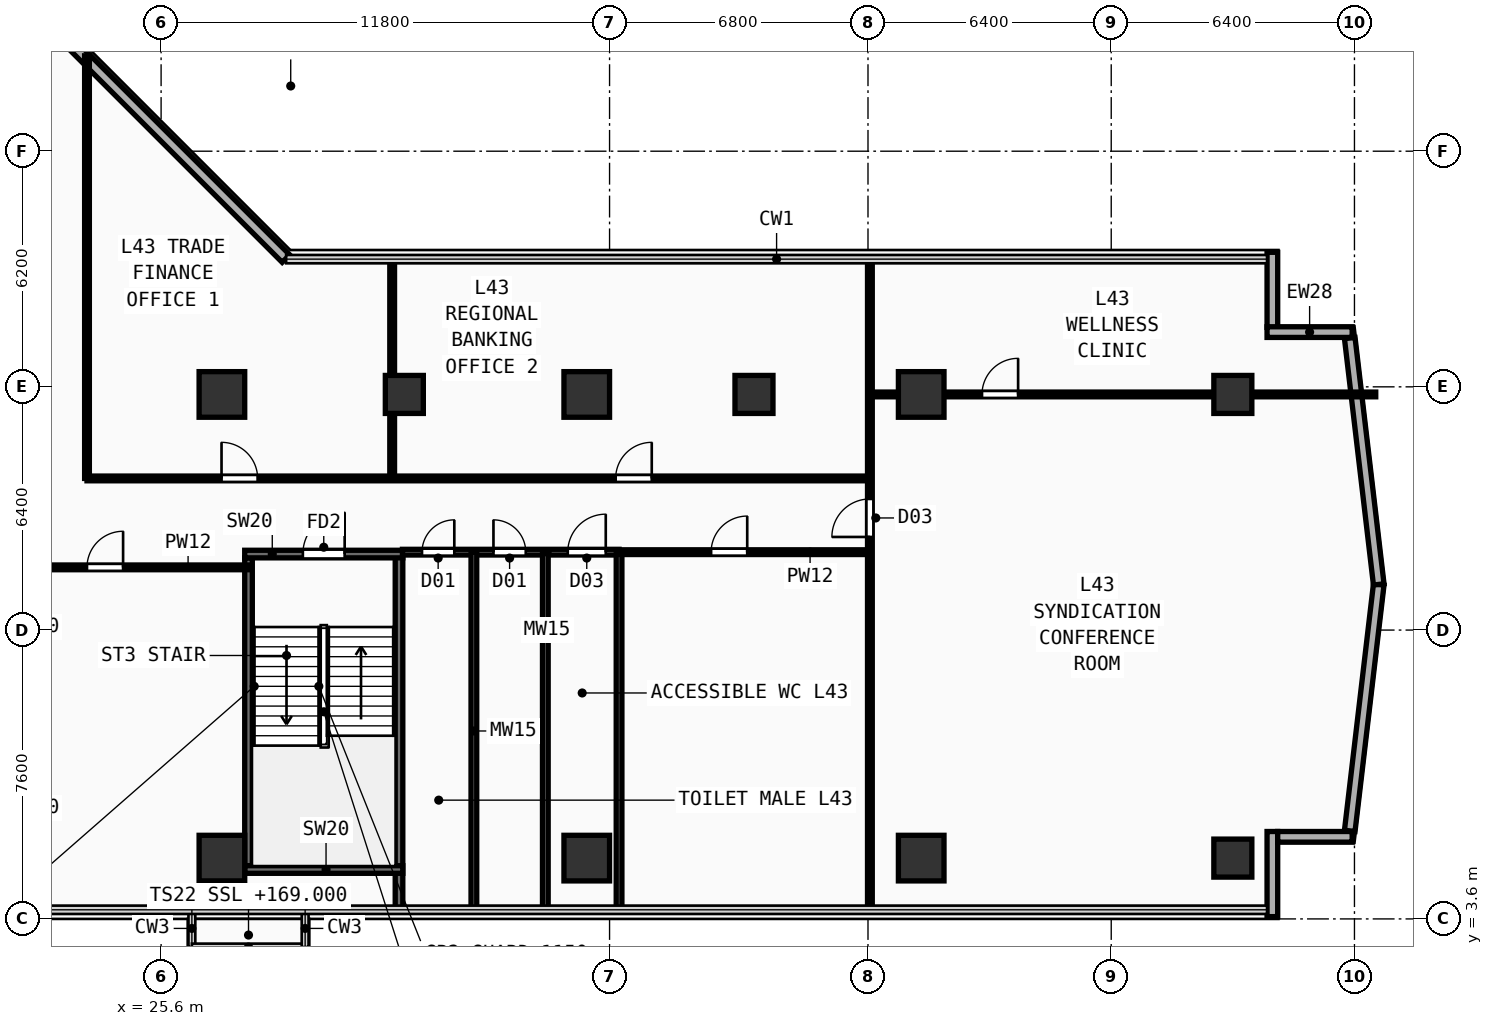
"""IFC4 building model, lengths in metres.
Left out: names, types, materials, properties, quantities, classifications, styles, units other than length and angle.
Written with IfcOpenShell. Run it as: python <this file> out.ifc"""

import sys

from ifc_helpers import new_model, si_unit, direction, frame, frame_2d, origin, origin_2d, place, context, subcontext, project, spatial, rectangle, extrude, element, fill, save


model = new_model("IFC4")
c1 = context("Model", 3, precision=1e-05, world=origin(), true_north=direction((0.0, 1.0)))
c2 = subcontext(c1, "Body", "Model", "MODEL_VIEW")
j1 = project(units=[si_unit("LENGTHUNIT", "METRE"), si_unit("PLANEANGLEUNIT", "RADIAN")], contexts=[c1])
p1 = place(None, origin())
s1 = spatial("IfcSite", under=j1, at=p1, CompositionType="ELEMENT")
p2 = place(p1, origin())
s2 = spatial("IfcBuilding", under=s1, at=p2, CompositionType="ELEMENT")
p3 = place(p2, frame((0.0, 0.0, 169.0)))
s3 = spatial("IfcBuildingStorey", under=s2, at=p3, CompositionType="ELEMENT", Elevation=169.0)
for number, where, z_axis, x_axis in (
    (1, (27.2, 5.2, 0.0), (0.0, 0.0, 1.0), (1.0, 0.0, 0.0)),
    (2, (36.8, 5.2, 0.0), (0.0, 0.0, 1.0), (1.0, 0.0, 0.0)),
    (3, (45.6, 5.2, 0.0), (0.0, 0.0, 1.0), (1.0, 0.0, 0.0)),
    (4, (27.2, 17.4, 0.0), (0.0, 0.0, 1.0), (1.0, 0.0, 0.0)),
    (5, (36.8, 17.4, 0.0), (0.0, 0.0, 1.0), (1.0, 0.0, 0.0)),
    (6, (45.6, 17.4, 0.0), (0.0, 0.0, 1.0), (1.0, 0.0, 0.0)),
):
    element("IfcColumn", number, at=place(p3, frame(where, z_axis=z_axis, x_axis=x_axis)), inside=s3, PredefinedType="COLUMN", context=c2, shape_type="SweptSolid", body=[
        extrude(rectangle(XDim=1.2, YDim=1.2, at=origin_2d()), origin(), (0.0, 0.0, 1.0), 3.56),
    ])
for number, where, z_axis, x_axis in (
    (7, (53.8, 5.2, 0.0), (0.0, 0.0, 1.0), (1.0, 0.0, 0.0)),
    (8, (53.8, 17.4, 0.0), (0.0, 0.0, 1.0), (1.0, 0.0, 0.0)),
    (9, (32.0, 17.4, 0.0), (0.0, 0.0, 1.0), (1.0, 0.0, 0.0)),
    (10, (41.2, 17.4, 0.0), (0.0, 0.0, 1.0), (1.0, 0.0, 0.0)),
):
    element("IfcColumn", number, at=place(p3, frame(where, z_axis=z_axis, x_axis=x_axis)), inside=s3, PredefinedType="COLUMN", context=c2, shape_type="SweptSolid", body=[
        extrude(rectangle(XDim=1.0, YDim=1.0, at=origin_2d()), origin(), (0.0, 0.0, 1.0), 3.56),
    ])
p4 = place(p3, frame((54.84, 3.66, 0.0), z_axis=(0.0, 0.0, 1.0), x_axis=(0.0, 1.0, 0.0)))
e11 = element("IfcWall", 11, at=p4, inside=s3, PredefinedType="SOLIDWALL", context=c2, shape_type="SweptSolid", body=[
    extrude(rectangle(XDim=2.24, YDim=0.28, at=frame_2d((1.12, 0.0))), origin(), (0.0, 0.0, 1.0), 3.56),
])
p5 = place(p3, frame((54.98, 5.76, 0.0), z_axis=(0.0, 0.0, 1.0), x_axis=(1.0, 0.0, 0.0)))
e12 = element("IfcWall", 12, at=p5, inside=s3, PredefinedType="SOLIDWALL", context=c2, shape_type="SweptSolid", body=[
    extrude(rectangle(XDim=1.96, YDim=0.28, at=frame_2d((0.98, 0.0))), origin(), (0.0, 0.0, 1.0), 3.56),
])
p6 = place(p3, frame((54.84, 19.165, 0.0), z_axis=(0.0, 0.0, 1.0), x_axis=(0.0, 1.0, 0.0)))
e13 = element("IfcWall", 13, at=p6, inside=s3, PredefinedType="SOLIDWALL", context=c2, shape_type="SweptSolid", body=[
    extrude(rectangle(XDim=1.975, YDim=0.28, at=frame_2d((0.987, 0.0))), origin(), (0.0, 0.0, 1.0), 3.56),
])
p7 = place(p3, frame((54.7, 19.04, 0.0), z_axis=(0.0, 0.0, 1.0), x_axis=(1.0, 0.0, 0.0)))
e14 = element("IfcWall", 14, at=p7, inside=s3, PredefinedType="SOLIDWALL", context=c2, shape_type="SweptSolid", body=[
    extrude(rectangle(XDim=2.24, YDim=0.28, at=frame_2d((1.12, 0.0))), origin(), (0.0, 0.0, 1.0), 3.56),
])
p8 = place(p3, frame((28.885, 20.975, 0.0), z_axis=(0.0, 0.0, 1.0), x_axis=(-0.707106781187, 0.707106781187, 0.0)))
e15 = element("IfcWall", 15, at=p8, inside=s3, PredefinedType="SOLIDWALL", context=c2, shape_type="SweptSolid", body=[
    extrude(rectangle(XDim=9.207, YDim=0.28, at=frame_2d((4.603, 0.0))), origin(), (0.0, 0.0, 1.0), 3.56),
])
for number, where, z_axis, x_axis in (
    (16, (56.876, 5.917, 0.0), (0.0, 0.0, 1.0), (0.117, 0.993, 0.0)),
    (17, (57.639, 12.401, 0.0), (0.0, 0.0, 1.0), (-0.117, 0.993, 0.0)),
):
    element("IfcWall", number, at=place(p3, frame(where, z_axis=z_axis, x_axis=x_axis)), inside=s3, PredefinedType="SOLIDWALL", context=c2, shape_type="SweptSolid", body=[
        extrude(rectangle(XDim=6.527, YDim=0.28, at=frame_2d((3.263, 0.0))), origin(), (0.0, 0.0, 1.0), 3.56),
    ])
p9 = place(p3, frame((27.9, 5.0, 0.0), z_axis=(0.0, 0.0, 1.0), x_axis=(0.0, 1.0, 0.0)))
e18 = element("IfcWall", 18, at=p9, inside=s3, PredefinedType="SHEAR", context=c2, shape_type="SweptSolid", body=[
    extrude(rectangle(XDim=8.1, YDim=0.2, at=frame_2d((4.05, 0.0))), origin(), (0.0, 0.0, 1.0), 3.56),
])
p10 = place(p3, frame((31.86, 3.84, 0.0), z_axis=(0.0, 0.0, 1.0), x_axis=(0.0, 1.0, 0.0)))
e19 = element("IfcWall", 19, at=p10, inside=s3, PredefinedType="SHEAR", context=c2, shape_type="SweptSolid", body=[
    extrude(rectangle(XDim=9.41, YDim=0.2, at=frame_2d((4.705, 0.0))), origin(), (0.0, 0.0, 1.0), 3.56),
])
p11 = place(p3, frame((27.8, 4.9, 0.0), z_axis=(0.0, 0.0, 1.0), x_axis=(1.0, 0.0, 0.0)))
e20 = element("IfcWall", 20, at=p11, inside=s3, PredefinedType="SHEAR", context=c2, shape_type="SweptSolid", body=[
    extrude(rectangle(XDim=4.16, YDim=0.2, at=frame_2d((2.08, 0.0))), origin(), (0.0, 0.0, 1.0), 3.56),
])
p12 = place(p3, frame((27.8, 13.2, 0.0), z_axis=(0.0, 0.0, 1.0), x_axis=(1.0, 0.0, 0.0)))
e21 = element("IfcWall", 21, at=p12, inside=s3, PredefinedType="SHEAR", context=c2, shape_type="SweptSolid", body=[
    extrude(rectangle(XDim=4.16, YDim=0.2, at=frame_2d((2.08, 0.0))), origin(), (0.0, 0.0, 1.0), 3.56),
])
p13 = place(p12, frame((1.53, 0.0, 0.0)))
e22 = element("IfcOpeningElement", 22, at=p13, cuts=e21, PredefinedType="OPENING", context=c2, shape_type="SweptSolid", body=[
    extrude(rectangle(XDim=1.1, YDim=2.2, at=frame_2d((0.55, 1.1))), frame((0.0, 0.11, 0.0), z_axis=(0.0, -1.0, 0.0), x_axis=(1.0, 0.0, 0.0)), (0.0, 0.0, 1.0), 0.22),
])
p14 = place(p3, frame((31.95, 13.25, 0.0), z_axis=(0.0, 0.0, 1.0), x_axis=(1.0, 0.0, 0.0)))
e23 = element("IfcWall", 23, at=p14, inside=s3, PredefinedType="PLUMBINGWALL", context=c2, shape_type="SweptSolid", body=[
    extrude(rectangle(XDim=5.7, YDim=0.15, at=frame_2d((2.85, 0.0))), origin(), (0.0, 0.0, 1.0), 3.16),
])
p15 = place(p14, frame((0.515, 0.0, 0.0)))
e24 = element("IfcOpeningElement", 24, at=p15, cuts=e23, PredefinedType="OPENING", context=c2, shape_type="SweptSolid", body=[
    extrude(rectangle(XDim=0.85, YDim=2.15, at=frame_2d((0.425, 1.075))), frame((0.0, 0.085, 0.0), z_axis=(0.0, -1.0, 0.0), x_axis=(1.0, 0.0, 0.0)), (0.0, 0.0, 1.0), 0.17),
])
p16 = place(p14, frame((2.395, 0.0, 0.0)))
e25 = element("IfcOpeningElement", 25, at=p16, cuts=e23, PredefinedType="OPENING", context=c2, shape_type="SweptSolid", body=[
    extrude(rectangle(XDim=0.85, YDim=2.15, at=frame_2d((0.425, 1.075))), frame((0.0, 0.085, 0.0), z_axis=(0.0, -1.0, 0.0), x_axis=(1.0, 0.0, 0.0)), (0.0, 0.0, 1.0), 0.17),
])
p17 = place(p14, frame((4.35, 0.0, 0.0)))
e26 = element("IfcOpeningElement", 26, at=p17, cuts=e23, PredefinedType="OPENING", context=c2, shape_type="SweptSolid", body=[
    extrude(rectangle(XDim=1.0, YDim=2.2, at=frame_2d((0.5, 1.1))), frame((0.0, 0.085, 0.0), z_axis=(0.0, -1.0, 0.0), x_axis=(1.0, 0.0, 0.0)), (0.0, 0.0, 1.0), 0.17),
])
for number, where, z_axis, x_axis in (
    (27, (33.83, 3.84, 0.0), (0.0, 0.0, 1.0), (0.0, 1.0, 0.0)),
    (28, (35.71, 3.84, 0.0), (0.0, 0.0, 1.0), (0.0, 1.0, 0.0)),
    (29, (37.65, 3.84, 0.0), (0.0, 0.0, 1.0), (0.0, 1.0, 0.0)),
):
    element("IfcWall", number, at=place(p3, frame(where, z_axis=z_axis, x_axis=x_axis)), inside=s3, PredefinedType="PLUMBINGWALL", context=c2, shape_type="SweptSolid", body=[
        extrude(rectangle(XDim=9.41, YDim=0.15, at=frame_2d((4.705, 0.0))), origin(), (0.0, 0.0, 1.0), 3.56),
    ])
p18 = place(p3, frame((20.85, 12.85, 0.0), z_axis=(0.0, 0.0, 1.0), x_axis=(1.0, 0.0, 0.0)))
e30 = element("IfcWall", 30, at=p18, inside=s3, PredefinedType="PARTITIONING", context=c2, shape_type="SweptSolid", body=[
    extrude(rectangle(XDim=7.05, YDim=0.125, at=frame_2d((3.525, 0.0))), origin(), (0.0, 0.0, 1.0), 3.56),
])
p19 = place(p18, frame((2.8, 0.0, 0.0)))
e31 = element("IfcOpeningElement", 31, at=p19, cuts=e30, PredefinedType="OPENING", context=c2, shape_type="SweptSolid", body=[
    extrude(rectangle(XDim=0.95, YDim=2.15, at=frame_2d((0.475, 1.075))), frame((0.0, 0.073, 0.0), z_axis=(0.0, -1.0, 0.0), x_axis=(1.0, 0.0, 0.0)), (0.0, 0.0, 1.0), 0.145),
])
p20 = place(p3, frame((37.65, 13.25, 0.0), z_axis=(0.0, 0.0, 1.0), x_axis=(1.0, 0.0, 0.0)))
e32 = element("IfcWall", 32, at=p20, inside=s3, PredefinedType="PARTITIONING", context=c2, shape_type="SweptSolid", body=[
    extrude(rectangle(XDim=6.6, YDim=0.125, at=frame_2d((3.3, 0.0))), origin(), (0.0, 0.0, 1.0), 3.16),
])
p21 = place(p20, frame((2.422, 0.0, 0.0)))
e33 = element("IfcOpeningElement", 33, at=p21, cuts=e32, PredefinedType="OPENING", context=c2, shape_type="SweptSolid", body=[
    extrude(rectangle(XDim=0.95, YDim=2.15, at=frame_2d((0.475, 1.075))), frame((0.0, 0.073, 0.0), z_axis=(0.0, -1.0, 0.0), x_axis=(1.0, 0.0, 0.0)), (0.0, 0.0, 1.0), 0.145),
])
p22 = place(p3, frame((44.25, 3.84, 0.0), z_axis=(0.0, 0.0, 1.0), x_axis=(0.0, 1.0, 0.0)))
e34 = element("IfcWall", 34, at=p22, inside=s3, PredefinedType="PARTITIONING", context=c2, shape_type="SweptSolid", body=[
    extrude(rectangle(XDim=17.12, YDim=0.125, at=frame_2d((8.56, 0.0))), origin(), (0.0, 0.0, 1.0), 3.56),
])
p23 = place(p22, frame((9.81, 0.0, 0.0)))
e35 = element("IfcOpeningElement", 35, at=p23, cuts=e34, PredefinedType="OPENING", context=c2, shape_type="SweptSolid", body=[
    extrude(rectangle(XDim=1.0, YDim=2.2, at=frame_2d((0.5, 1.1))), frame((0.0, 0.073, 0.0), z_axis=(0.0, -1.0, 0.0), x_axis=(1.0, 0.0, 0.0)), (0.0, 0.0, 1.0), 0.145),
])
p24 = place(p3, frame((44.25, 17.4, 0.0), z_axis=(0.0, 0.0, 1.0), x_axis=(1.0, 0.0, 0.0)))
e36 = element("IfcWall", 36, at=p24, inside=s3, PredefinedType="PARTITIONING", context=c2, shape_type="SweptSolid", body=[
    extrude(rectangle(XDim=13.31, YDim=0.125, at=frame_2d((6.655, 0.0))), origin(), (0.0, 0.0, 1.0), 3.2),
])
p25 = place(p24, frame((2.95, 0.0, 0.0)))
e37 = element("IfcOpeningElement", 37, at=p25, cuts=e36, PredefinedType="OPENING", context=c2, shape_type="SweptSolid", body=[
    extrude(rectangle(XDim=0.95, YDim=2.15, at=frame_2d((0.475, 1.075))), frame((0.0, 0.073, 0.0), z_axis=(0.0, -1.0, 0.0), x_axis=(1.0, 0.0, 0.0)), (0.0, 0.0, 1.0), 0.145),
])
p26 = place(p3, frame((23.65, 15.19, 0.0), z_axis=(0.0, 0.0, 1.0), x_axis=(0.0, 1.0, 0.0)))
e38 = element("IfcWall", 38, at=p26, inside=s3, PredefinedType="PARTITIONING", context=c2, shape_type="SweptSolid", body=[
    extrude(rectangle(XDim=11.12, YDim=0.125, at=frame_2d((5.56, 0.0))), origin(), (0.0, 0.0, 1.0), 3.56),
])
p27 = place(p3, frame((23.65, 15.19, 0.0), z_axis=(0.0, 0.0, 1.0), x_axis=(1.0, 0.0, 0.0)))
e39 = element("IfcWall", 39, at=p27, inside=s3, PredefinedType="PARTITIONING", context=c2, shape_type="SweptSolid", body=[
    extrude(rectangle(XDim=20.6, YDim=0.125, at=frame_2d((10.3, 0.0))), origin(), (0.0, 0.0, 1.0), 3.56),
])
p28 = place(p27, frame((3.54, 0.0, 0.0)))
e40 = element("IfcOpeningElement", 40, at=p28, cuts=e39, PredefinedType="OPENING", context=c2, shape_type="SweptSolid", body=[
    extrude(rectangle(XDim=0.95, YDim=2.15, at=frame_2d((0.475, 1.075))), frame((0.0, 0.073, 0.0), z_axis=(0.0, -1.0, 0.0), x_axis=(1.0, 0.0, 0.0)), (0.0, 0.0, 1.0), 0.145),
])
p29 = place(p27, frame((13.91, 0.0, 0.0)))
e41 = element("IfcOpeningElement", 41, at=p29, cuts=e39, PredefinedType="OPENING", context=c2, shape_type="SweptSolid", body=[
    extrude(rectangle(XDim=0.95, YDim=2.15, at=frame_2d((0.475, 1.075))), frame((0.0, 0.073, 0.0), z_axis=(0.0, -1.0, 0.0), x_axis=(1.0, 0.0, 0.0)), (0.0, 0.0, 1.0), 0.145),
])
p30 = place(p3, frame((31.68, 15.19, 0.0), z_axis=(0.0, 0.0, 1.0), x_axis=(0.0, 1.0, 0.0)))
e42 = element("IfcWall", 42, at=p30, inside=s3, PredefinedType="PARTITIONING", context=c2, shape_type="SweptSolid", body=[
    extrude(rectangle(XDim=5.77, YDim=0.125, at=frame_2d((2.885, 0.0))), origin(), (0.0, 0.0, 1.0), 3.56),
])
p31 = place(p13, frame((1.1, 0.0, 0.0), z_axis=(0.0, 0.0, 1.0), x_axis=(-1.0, 0.0, 0.0)))
e43 = element("IfcDoor", 43, at=p31, inside=s3, OperationType="SINGLE_SWING_LEFT", PredefinedType="DOOR", context=c2, shape_type="SweptSolid", body=[
    extrude(rectangle(XDim=1.1, YDim=2.2, at=frame_2d((0.55, 1.1))), frame((0.0, 0.025, 0.0), z_axis=(0.0, -1.0, 0.0), x_axis=(1.0, 0.0, 0.0)), (0.0, 0.0, 1.0), 0.05),
])
fill(e22, e43)
p32 = place(p15, origin())
e44 = element("IfcDoor", 44, at=p32, inside=s3, OperationType="SINGLE_SWING_RIGHT", PredefinedType="DOOR", context=c2, shape_type="SweptSolid", body=[
    extrude(rectangle(XDim=0.85, YDim=2.15, at=frame_2d((0.425, 1.075))), frame((0.0, 0.025, 0.0), z_axis=(0.0, -1.0, 0.0), x_axis=(1.0, 0.0, 0.0)), (0.0, 0.0, 1.0), 0.05),
])
fill(e24, e44)
p33 = place(p16, origin())
e45 = element("IfcDoor", 45, at=p33, inside=s3, OperationType="SINGLE_SWING_LEFT", PredefinedType="DOOR", context=c2, shape_type="SweptSolid", body=[
    extrude(rectangle(XDim=0.85, YDim=2.15, at=frame_2d((0.425, 1.075))), frame((0.0, 0.025, 0.0), z_axis=(0.0, -1.0, 0.0), x_axis=(1.0, 0.0, 0.0)), (0.0, 0.0, 1.0), 0.05),
])
fill(e25, e45)
p34 = place(p17, origin())
e46 = element("IfcDoor", 46, at=p34, inside=s3, OperationType="SINGLE_SWING_RIGHT", PredefinedType="DOOR", context=c2, shape_type="SweptSolid", body=[
    extrude(rectangle(XDim=1.0, YDim=2.2, at=frame_2d((0.5, 1.1))), frame((0.0, 0.025, 0.0), z_axis=(0.0, -1.0, 0.0), x_axis=(1.0, 0.0, 0.0)), (0.0, 0.0, 1.0), 0.05),
])
fill(e26, e46)
p35 = place(p19, origin())
e47 = element("IfcDoor", 47, at=p35, inside=s3, OperationType="SINGLE_SWING_RIGHT", PredefinedType="DOOR", context=c2, shape_type="SweptSolid", body=[
    extrude(rectangle(XDim=0.95, YDim=2.15, at=frame_2d((0.475, 1.075))), frame((0.0, 0.025, 0.0), z_axis=(0.0, -1.0, 0.0), x_axis=(1.0, 0.0, 0.0)), (0.0, 0.0, 1.0), 0.05),
])
fill(e31, e47)
p36 = place(p21, origin())
e48 = element("IfcDoor", 48, at=p36, inside=s3, OperationType="SINGLE_SWING_RIGHT", PredefinedType="DOOR", context=c2, shape_type="SweptSolid", body=[
    extrude(rectangle(XDim=0.95, YDim=2.15, at=frame_2d((0.475, 1.075))), frame((0.0, 0.025, 0.0), z_axis=(0.0, -1.0, 0.0), x_axis=(1.0, 0.0, 0.0)), (0.0, 0.0, 1.0), 0.05),
])
fill(e33, e48)
p37 = place(p23, origin())
e49 = element("IfcDoor", 49, at=p37, inside=s3, OperationType="SINGLE_SWING_LEFT", PredefinedType="DOOR", context=c2, shape_type="SweptSolid", body=[
    extrude(rectangle(XDim=1.0, YDim=2.2, at=frame_2d((0.5, 1.1))), frame((0.0, 0.025, 0.0), z_axis=(0.0, -1.0, 0.0), x_axis=(1.0, 0.0, 0.0)), (0.0, 0.0, 1.0), 0.05),
])
fill(e35, e49)
p38 = place(p25, origin())
e50 = element("IfcDoor", 50, at=p38, inside=s3, OperationType="SINGLE_SWING_RIGHT", PredefinedType="DOOR", context=c2, shape_type="SweptSolid", body=[
    extrude(rectangle(XDim=0.95, YDim=2.15, at=frame_2d((0.475, 1.075))), frame((0.0, 0.025, 0.0), z_axis=(0.0, -1.0, 0.0), x_axis=(1.0, 0.0, 0.0)), (0.0, 0.0, 1.0), 0.05),
])
fill(e37, e50)
p39 = place(p28, origin())
e51 = element("IfcDoor", 51, at=p39, inside=s3, OperationType="SINGLE_SWING_LEFT", PredefinedType="DOOR", context=c2, shape_type="SweptSolid", body=[
    extrude(rectangle(XDim=0.95, YDim=2.15, at=frame_2d((0.475, 1.075))), frame((0.0, 0.025, 0.0), z_axis=(0.0, -1.0, 0.0), x_axis=(1.0, 0.0, 0.0)), (0.0, 0.0, 1.0), 0.05),
])
fill(e40, e51)
p40 = place(p29, origin())
e52 = element("IfcDoor", 52, at=p40, inside=s3, OperationType="SINGLE_SWING_RIGHT", PredefinedType="DOOR", context=c2, shape_type="SweptSolid", body=[
    extrude(rectangle(XDim=0.95, YDim=2.15, at=frame_2d((0.475, 1.075))), frame((0.0, 0.025, 0.0), z_axis=(0.0, -1.0, 0.0), x_axis=(1.0, 0.0, 0.0)), (0.0, 0.0, 1.0), 0.05),
])
fill(e41, e52)
save(model, sys.argv[1])
